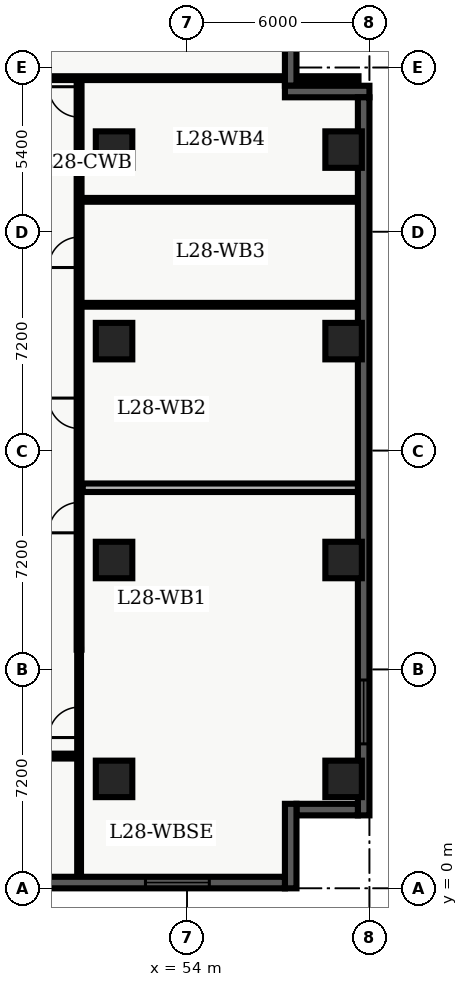
"""IFC4 building model, lengths in metres.
Left out: names, types, materials, properties, quantities, classifications, styles, units other than length and angle.
Written with IfcOpenShell. Run it as: python <this file> out.ifc"""

import sys

from ifc_helpers import new_model, entity, si_unit, converted_unit, direction, frame, origin_with_axes, origin_2d_with_axis, place, context, subcontext, project, spatial, polyline, rectangle, outline, extrude, element, fill, save


model = new_model("IFC4")
c1 = context("Model", 3, precision=1e-05, world=origin_with_axes(), true_north=direction((0.0, 1.0)))
c2 = subcontext(c1, "Body", "Model", "MODEL_VIEW")
j1 = project(units=[si_unit("LENGTHUNIT", "METRE"), converted_unit("PLANEANGLEUNIT", "DEGREE", entity("IfcPlaneAngleMeasure", 0.017), si_unit("PLANEANGLEUNIT", "RADIAN"), dimensions=[0, 0, 0, 0, 0, 0, 0])], contexts=[c1])
p1 = place(None, origin_with_axes())
s1 = spatial("IfcSite", under=j1, at=p1, CompositionType="ELEMENT")
p2 = place(p1, origin_with_axes())
s2 = spatial("IfcBuilding", under=s1, at=p2, CompositionType="ELEMENT")
p3 = place(p2, frame((0.0, 0.0, 116.4), z_axis=(0.0, 0.0, 1.0), x_axis=(1.0, 0.0, 0.0)))
s3 = spatial("IfcBuildingStorey", under=s2, at=p3, CompositionType="ELEMENT", Elevation=116.4)
for number, where, z_axis, x_axis in (
    (1, (51.6, 3.6, 0.0), (0.0, 0.0, 1.0), (1.0, 0.0, 0.0)),
    (2, (51.6, 10.8, 0.0), (0.0, 0.0, 1.0), (1.0, 0.0, 0.0)),
    (3, (51.6, 18.0, 0.0), (0.0, 0.0, 1.0), (1.0, 0.0, 0.0)),
    (4, (51.6, 24.3, 0.0), (0.0, 0.0, 1.0), (1.0, 0.0, 0.0)),
    (5, (59.15, 3.6, 0.0), (0.0, 0.0, 1.0), (1.0, 0.0, 0.0)),
    (6, (59.15, 10.8, 0.0), (0.0, 0.0, 1.0), (1.0, 0.0, 0.0)),
    (7, (59.15, 18.0, 0.0), (0.0, 0.0, 1.0), (1.0, 0.0, 0.0)),
    (8, (59.15, 24.3, 0.0), (0.0, 0.0, 1.0), (1.0, 0.0, 0.0)),
):
    element("IfcColumn", number, at=place(p3, frame(where, z_axis=z_axis, x_axis=x_axis)), inside=s3, PredefinedType="COLUMN", context=c2, shape_type="SweptSolid", body=[
        extrude(rectangle(XDim=1.2, YDim=1.2, at=origin_2d_with_axis()), origin_with_axes(), (0.0, 0.0, 1.0), 3.9),
    ])
p4 = place(p3, frame((50.45, 7.85, 0.0), z_axis=(0.0, 0.0, 1.0), x_axis=(0.0, 1.0, 0.0)))
e9 = element("IfcWall", 9, at=p4, inside=s3, PredefinedType="PARTITIONING", context=c2, shape_type="SweptSolid", body=[
    extrude(outline(polyline([(0.0, -0.08), (18.8, -0.08), (18.8, 0.08), (0.0, 0.08), (0.0, -0.08)])), origin_with_axes(), (0.0, 0.0, 1.0), 2.7),
])
p5 = place(p4, frame((4.344, 0.0, 0.0), z_axis=(0.0, 0.0, 1.0), x_axis=(1.0, 0.0, 0.0)))
e10 = element("IfcOpeningElement", 10, at=p5, cuts=e9, PredefinedType="OPENING", context=c2, shape_type="SweptSolid", body=[
    extrude(rectangle(XDim=1.0, YDim=0.18, at=origin_2d_with_axis()), origin_with_axes(), (0.0, 0.0, 1.0), 2.15),
])
p6 = place(p4, frame((7.776, 0.0, 0.0), z_axis=(0.0, 0.0, 1.0), x_axis=(1.0, 0.0, 0.0)))
e11 = element("IfcOpeningElement", 11, at=p6, cuts=e9, PredefinedType="OPENING", context=c2, shape_type="SweptSolid", body=[
    extrude(rectangle(XDim=1.0, YDim=0.18, at=origin_2d_with_axis()), origin_with_axes(), (0.0, 0.0, 1.0), 2.15),
])
p7 = place(p4, frame((13.071, 0.0, 0.0), z_axis=(0.0, 0.0, 1.0), x_axis=(1.0, 0.0, 0.0)))
e12 = element("IfcOpeningElement", 12, at=p7, cuts=e9, PredefinedType="OPENING", context=c2, shape_type="SweptSolid", body=[
    extrude(rectangle(XDim=1.0, YDim=0.18, at=origin_2d_with_axis()), origin_with_axes(), (0.0, 0.0, 1.0), 2.15),
])
p8 = place(p4, frame((18.018, 0.0, 0.0), z_axis=(0.0, 0.0, 1.0), x_axis=(1.0, 0.0, 0.0)))
e13 = element("IfcOpeningElement", 13, at=p8, cuts=e9, PredefinedType="OPENING", context=c2, shape_type="SweptSolid", body=[
    extrude(rectangle(XDim=1.0, YDim=0.18, at=origin_2d_with_axis()), origin_with_axes(), (0.0, 0.0, 1.0), 2.15),
])
p9 = place(p3, frame((38.76, 26.65, 0.0), z_axis=(0.0, 0.0, 1.0), x_axis=(1.0, 0.0, 0.0)))
e14 = element("IfcWall", 14, at=p9, inside=s3, PredefinedType="PARTITIONING", context=c2, shape_type="SweptSolid", body=[
    extrude(outline(polyline([(0.0, -0.062), (20.88, -0.062), (20.88, 0.062), (0.0, 0.062), (0.0, -0.062)])), origin_with_axes(), (0.0, 0.0, 1.0), 2.7),
])
p10 = place(p9, frame((4.24, 0.0, 0.0), z_axis=(0.0, 0.0, 1.0), x_axis=(1.0, 0.0, 0.0)))
e15 = element("IfcOpeningElement", 15, at=p10, cuts=e14, PredefinedType="OPENING", context=c2, shape_type="SweptSolid", body=[
    extrude(rectangle(XDim=1.0, YDim=0.145, at=origin_2d_with_axis()), origin_with_axes(), (0.0, 0.0, 1.0), 2.15),
])
p11 = place(p3, frame((44.55, 4.35, 0.0), z_axis=(0.0, 0.0, 1.0), x_axis=(1.0, 0.0, 0.0)))
e16 = element("IfcWall", 16, at=p11, inside=s3, PredefinedType="PARTITIONING", context=c2, shape_type="SweptSolid", body=[
    extrude(outline(polyline([(0.0, -0.08), (5.9, -0.08), (5.9, 0.08), (0.0, 0.08), (0.0, -0.08)])), origin_with_axes(), (0.0, 0.0, 1.0), 2.7),
])
p12 = place(p11, frame((1.7, 0.0, 0.0), z_axis=(0.0, 0.0, 1.0), x_axis=(1.0, 0.0, 0.0)))
e17 = element("IfcOpeningElement", 17, at=p12, cuts=e16, PredefinedType="OPENING", context=c2, shape_type="SweptSolid", body=[
    extrude(rectangle(XDim=1.0, YDim=0.18, at=origin_2d_with_axis()), origin_with_axes(), (0.0, 0.0, 1.0), 2.15),
])
p13 = place(p3, frame((50.45, 0.36, 0.0), z_axis=(0.0, 0.0, 1.0), x_axis=(0.0, 1.0, 0.0)))
e18 = element("IfcWall", 18, at=p13, inside=s3, PredefinedType="PARTITIONING", context=c2, shape_type="SweptSolid", body=[
    extrude(outline(polyline([(0.0, -0.062), (7.49, -0.062), (7.49, 0.062), (0.0, 0.062), (0.0, -0.062)])), origin_with_axes(), (0.0, 0.0, 1.0), 2.7),
])
p14 = place(p13, frame((5.1, 0.0, 0.0), z_axis=(0.0, 0.0, 1.0), x_axis=(1.0, 0.0, 0.0)))
e19 = element("IfcOpeningElement", 19, at=p14, cuts=e18, PredefinedType="OPENING", context=c2, shape_type="SweptSolid", body=[
    extrude(rectangle(XDim=1.0, YDim=0.145, at=origin_2d_with_axis()), origin_with_axes(), (0.0, 0.0, 1.0), 2.15),
])
p15 = place(p3, frame((50.57, 13.177, 0.0), z_axis=(0.0, 0.0, 1.0), x_axis=(1.0, 0.0, 0.0)))
e20 = element("IfcWall", 20, at=p15, inside=s3, PredefinedType="PARTITIONING", context=c2, shape_type="SweptSolid", body=[
    extrude(outline(polyline([(0.0, -0.14), (9.055, -0.14), (9.055, 0.14), (0.0, 0.14), (0.0, -0.14)])), origin_with_axes(), (0.0, 0.0, 1.0), 2.7),
])
for number, where, z_axis, x_axis in (
    (21, (50.57, 19.195, 0.0), (0.0, 0.0, 1.0), (1.0, 0.0, 0.0)),
    (22, (50.57, 22.647, 0.0), (0.0, 0.0, 1.0), (1.0, 0.0, 0.0)),
):
    element("IfcWall", number, at=place(p3, frame(where, z_axis=z_axis, x_axis=x_axis)), inside=s3, PredefinedType="PARTITIONING", context=c2, shape_type="SweptSolid", body=[
        extrude(outline(polyline([(0.0, -0.062), (9.055, -0.062), (9.055, 0.062), (0.0, 0.062), (0.0, -0.062)])), origin_with_axes(), (0.0, 0.0, 1.0), 2.7),
    ])
p16 = place(p3, frame((57.41, 28.42, 0.0), z_axis=(0.0, 0.0, 1.0), x_axis=(0.0, -1.0, 0.0)))
e23 = element("IfcWall", 23, at=p16, inside=s3, PredefinedType="SOLIDWALL", context=c2, shape_type="SweptSolid", body=[
    extrude(outline(polyline([(0.0, -0.19), (2.02, -0.19), (2.02, 0.19), (0.0, 0.19), (0.0, -0.19)])), origin_with_axes(), (0.0, 0.0, 1.0), 3.66),
])
p17 = place(p3, frame((57.22, 26.21, 0.0), z_axis=(0.0, 0.0, 1.0), x_axis=(1.0, 0.0, 0.0)))
e24 = element("IfcWall", 24, at=p17, inside=s3, PredefinedType="SOLIDWALL", context=c2, shape_type="SweptSolid", body=[
    extrude(outline(polyline([(0.0, -0.19), (2.78, -0.19), (2.78, 0.19), (0.0, 0.19), (0.0, -0.19)])), origin_with_axes(), (0.0, 0.0, 1.0), 3.66),
])
p18 = place(p3, frame((59.81, 26.02, 0.0), z_axis=(0.0, 0.0, 1.0), x_axis=(0.0, -1.0, 0.0)))
e25 = element("IfcWall", 25, at=p18, inside=s3, PredefinedType="SOLIDWALL", context=c2, shape_type="SweptSolid", body=[
    extrude(outline(polyline([(0.0, -0.19), (23.62, -0.19), (23.62, 0.19), (0.0, 0.19), (0.0, -0.19)])), origin_with_axes(), (0.0, 0.0, 1.0), 3.66),
])
p19 = place(p18, frame((20.218, 0.0, 0.45), z_axis=(0.0, 0.0, 1.0), x_axis=(1.0, 0.0, 0.0)))
e26 = element("IfcOpeningElement", 26, at=p19, cuts=e25, PredefinedType="OPENING", context=c2, shape_type="SweptSolid", body=[
    extrude(rectangle(XDim=2.1, YDim=0.4, at=origin_2d_with_axis()), origin_with_axes(), (0.0, 0.0, 1.0), 2.2),
])
p20 = place(p3, frame((59.62, 2.59, 0.0), z_axis=(0.0, 0.0, 1.0), x_axis=(-1.0, 0.0, 0.0)))
e27 = element("IfcWall", 27, at=p20, inside=s3, PredefinedType="SOLIDWALL", context=c2, shape_type="SweptSolid", body=[
    extrude(outline(polyline([(0.0, -0.19), (2.02, -0.19), (2.02, 0.19), (0.0, 0.19), (0.0, -0.19)])), origin_with_axes(), (0.0, 0.0, 1.0), 3.66),
])
p21 = place(p3, frame((57.41, 2.78, 0.0), z_axis=(0.0, 0.0, 1.0), x_axis=(0.0, -1.0, 0.0)))
e28 = element("IfcWall", 28, at=p21, inside=s3, PredefinedType="SOLIDWALL", context=c2, shape_type="SweptSolid", body=[
    extrude(outline(polyline([(0.0, -0.19), (2.78, -0.19), (2.78, 0.19), (0.0, 0.19), (0.0, -0.19)])), origin_with_axes(), (0.0, 0.0, 1.0), 3.66),
])
p22 = place(p3, frame((57.22, 0.19, 0.0), z_axis=(0.0, 0.0, 1.0), x_axis=(-1.0, 0.0, 0.0)))
e29 = element("IfcWall", 29, at=p22, inside=s3, PredefinedType="SOLIDWALL", context=c2, shape_type="SweptSolid", body=[
    extrude(outline(polyline([(0.0, -0.19), (18.82, -0.19), (18.82, 0.19), (0.0, 0.19), (0.0, -0.19)])), origin_with_axes(), (0.0, 0.0, 1.0), 3.66),
])
p23 = place(p22, frame((3.537, 0.0, 0.45), z_axis=(0.0, 0.0, 1.0), x_axis=(1.0, 0.0, 0.0)))
e30 = element("IfcOpeningElement", 30, at=p23, cuts=e29, PredefinedType="OPENING", context=c2, shape_type="SweptSolid", body=[
    extrude(rectangle(XDim=2.1, YDim=0.4, at=origin_2d_with_axis()), origin_with_axes(), (0.0, 0.0, 1.0), 2.2),
])
p24 = place(p22, frame((9.41, 0.0, 0.45), z_axis=(0.0, 0.0, 1.0), x_axis=(1.0, 0.0, 0.0)))
e31 = element("IfcOpeningElement", 31, at=p24, cuts=e29, PredefinedType="OPENING", context=c2, shape_type="SweptSolid", body=[
    extrude(rectangle(XDim=2.1, YDim=0.4, at=origin_2d_with_axis()), origin_with_axes(), (0.0, 0.0, 1.0), 2.2),
])
p25 = place(p22, frame((15.283, 0.0, 0.45), z_axis=(0.0, 0.0, 1.0), x_axis=(1.0, 0.0, 0.0)))
e32 = element("IfcOpeningElement", 32, at=p25, cuts=e29, PredefinedType="OPENING", context=c2, shape_type="SweptSolid", body=[
    extrude(rectangle(XDim=2.1, YDim=0.4, at=origin_2d_with_axis()), origin_with_axes(), (0.0, 0.0, 1.0), 2.2),
])
p26 = place(p13, frame((5.1, 0.0, 0.0), z_axis=(0.0, 0.0, 1.0), x_axis=(1.0, 0.0, 0.0)))
e33 = element("IfcDoor", 33, at=p26, inside=s3, OperationType="SINGLE_SWING_LEFT", PredefinedType="DOOR", context=c2, shape_type="SweptSolid", body=[
    extrude(rectangle(XDim=1.0, YDim=0.075, at=origin_2d_with_axis()), origin_with_axes(), (0.0, 0.0, 1.0), 2.15),
])
fill(e19, e33)
p27 = place(p4, frame((4.344, 0.0, 0.0), z_axis=(0.0, 0.0, 1.0), x_axis=(1.0, 0.0, 0.0)))
e34 = element("IfcDoor", 34, at=p27, inside=s3, OperationType="SINGLE_SWING_LEFT", PredefinedType="DOOR", context=c2, shape_type="SweptSolid", body=[
    extrude(rectangle(XDim=1.0, YDim=0.09, at=origin_2d_with_axis()), origin_with_axes(), (0.0, 0.0, 1.0), 2.15),
])
fill(e10, e34)
p28 = place(p4, frame((7.776, 0.0, 0.0), z_axis=(0.0, 0.0, 1.0), x_axis=(1.0, 0.0, 0.0)))
e35 = element("IfcDoor", 35, at=p28, inside=s3, OperationType="SINGLE_SWING_RIGHT", PredefinedType="DOOR", context=c2, shape_type="SweptSolid", body=[
    extrude(rectangle(XDim=1.0, YDim=0.09, at=origin_2d_with_axis()), origin_with_axes(), (0.0, 0.0, 1.0), 2.15),
])
fill(e11, e35)
p29 = place(p4, frame((13.071, 0.0, 0.0), z_axis=(0.0, 0.0, 1.0), x_axis=(1.0, 0.0, 0.0)))
e36 = element("IfcDoor", 36, at=p29, inside=s3, OperationType="SINGLE_SWING_LEFT", PredefinedType="DOOR", context=c2, shape_type="SweptSolid", body=[
    extrude(rectangle(XDim=1.0, YDim=0.09, at=origin_2d_with_axis()), origin_with_axes(), (0.0, 0.0, 1.0), 2.15),
])
fill(e12, e36)
p30 = place(p4, frame((18.018, 0.0, 0.0), z_axis=(0.0, 0.0, 1.0), x_axis=(1.0, 0.0, 0.0)))
e37 = element("IfcDoor", 37, at=p30, inside=s3, OperationType="SINGLE_SWING_RIGHT", PredefinedType="DOOR", context=c2, shape_type="SweptSolid", body=[
    extrude(rectangle(XDim=1.0, YDim=0.09, at=origin_2d_with_axis()), origin_with_axes(), (0.0, 0.0, 1.0), 2.15),
])
fill(e13, e37)
p31 = place(p18, frame((20.218, 0.0, 0.45), z_axis=(0.0, 0.0, 1.0), x_axis=(1.0, 0.0, 0.0)))
e38 = element("IfcWindow", 38, at=p31, inside=s3, PredefinedType="WINDOW", context=c2, shape_type="SweptSolid", body=[
    extrude(rectangle(XDim=2.1, YDim=0.09, at=origin_2d_with_axis()), origin_with_axes(), (0.0, 0.0, 1.0), 2.2),
])
fill(e26, e38)
p32 = place(p22, frame((3.537, 0.0, 0.45), z_axis=(0.0, 0.0, 1.0), x_axis=(1.0, 0.0, 0.0)))
e39 = element("IfcWindow", 39, at=p32, inside=s3, PredefinedType="WINDOW", context=c2, shape_type="SweptSolid", body=[
    extrude(rectangle(XDim=2.1, YDim=0.09, at=origin_2d_with_axis()), origin_with_axes(), (0.0, 0.0, 1.0), 2.2),
])
fill(e30, e39)
save(model, sys.argv[1])
